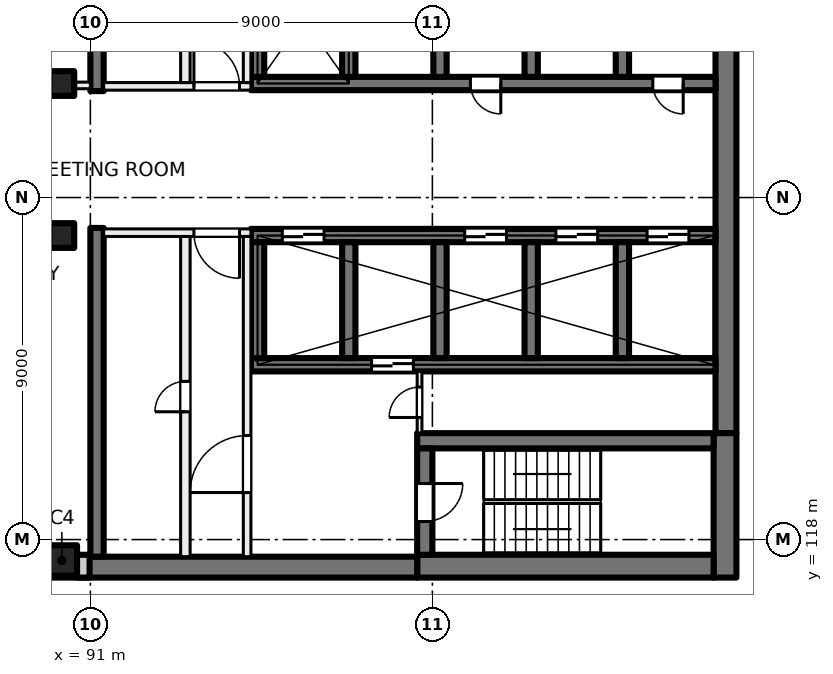
"""IFC4 building model, lengths in metres.
Left out: names, types, materials, properties, quantities, classifications, styles, units other than length and angle.
Written with IfcOpenShell. Run it as: python <this file> out.ifc"""

import sys

from ifc_helpers import new_model, si_unit, direction, frame, frame_2d, origin, origin_2d, place, context, subcontext, project, spatial, rectangle, extrude, element, fill, save


model = new_model("IFC4")
c1 = context("Model", 3, precision=1e-05, world=origin(), true_north=direction((0.0, 1.0)))
c2 = subcontext(c1, "Body", "Model", "MODEL_VIEW")
j1 = project(units=[si_unit("LENGTHUNIT", "METRE"), si_unit("PLANEANGLEUNIT", "RADIAN")], contexts=[c1])
p1 = place(None, origin())
s1 = spatial("IfcSite", under=j1, at=p1, CompositionType="ELEMENT")
p2 = place(p1, origin())
s2 = spatial("IfcBuilding", under=s1, at=p2, CompositionType="ELEMENT")
p3 = place(p2, frame((0.0, 0.0, 162.5)))
s3 = spatial("IfcBuildingStorey", under=s2, at=p3, CompositionType="ELEMENT", Elevation=162.5)
for number, where, z_axis, x_axis in (
    (1, (90.25, 130.0, 0.0), (0.0, 0.0, 1.0), (1.0, 0.0, 0.0)),
    (2, (90.25, 126.0, 0.0), (0.0, 0.0, 1.0), (1.0, 0.0, 0.0)),
):
    element("IfcColumn", number, at=place(p3, frame(where, z_axis=z_axis, x_axis=x_axis)), inside=s3, PredefinedType="COLUMN", context=c2, shape_type="SweptSolid", body=[
        extrude(rectangle(XDim=0.65, YDim=0.65, at=origin_2d()), origin(), (0.0, 0.0, 1.0), 4.0),
    ])
p4 = place(p3, frame((90.25, 117.45, 0.0), z_axis=(0.0, 0.0, 1.0), x_axis=(1.0, 0.0, 0.0)))
e3 = element("IfcColumn", 3, at=p4, inside=s3, PredefinedType="COLUMN", context=c2, shape_type="SweptSolid", body=[
    extrude(rectangle(XDim=0.8, YDim=0.8, at=origin_2d()), origin(), (0.0, 0.0, 1.0), 4.0),
])
p5 = place(p3, frame((107.725, 135.2, 0.0), z_axis=(0.0, 0.0, 1.0), x_axis=(0.0, -1.0, 0.0)))
e4 = element("IfcWall", 4, at=p5, inside=s3, PredefinedType="SHEAR", context=c2, shape_type="SweptSolid", body=[
    extrude(rectangle(XDim=14.4, YDim=0.55, at=frame_2d((7.2, 0.0))), origin(), (0.0, 0.0, 1.0), 4.0),
])
p6 = place(p3, frame((107.7, 120.8, 0.0), z_axis=(0.0, 0.0, 1.0), x_axis=(0.0, -1.0, 0.0)))
e5 = element("IfcWall", 5, at=p6, inside=s3, PredefinedType="SHEAR", context=c2, shape_type="SweptSolid", body=[
    extrude(rectangle(XDim=3.8, YDim=0.6, at=frame_2d((1.9, 0.0))), origin(), (0.0, 0.0, 1.0), 4.0),
])
p7 = place(p3, frame((107.4, 117.3, 0.0), z_axis=(0.0, 0.0, 1.0), x_axis=(-1.0, 0.0, 0.0)))
e6 = element("IfcWall", 6, at=p7, inside=s3, PredefinedType="SHEAR", context=c2, shape_type="SweptSolid", body=[
    extrude(rectangle(XDim=7.8, YDim=0.6, at=frame_2d((3.9, 0.0))), origin(), (0.0, 0.0, 1.0), 4.0),
])
p8 = place(p3, frame((99.6, 117.275, 0.0), z_axis=(0.0, 0.0, 1.0), x_axis=(-1.0, 0.0, 0.0)))
e7 = element("IfcWall", 7, at=p8, inside=s3, PredefinedType="SHEAR", context=c2, shape_type="SweptSolid", body=[
    extrude(rectangle(XDim=8.95, YDim=0.55, at=frame_2d((4.475, 0.0))), origin(), (0.0, 0.0, 1.0), 4.0),
])
p9 = place(p3, frame((107.4, 120.6, 0.0), z_axis=(0.0, 0.0, 1.0), x_axis=(-1.0, 0.0, 0.0)))
e8 = element("IfcWall", 8, at=p9, inside=s3, PredefinedType="SHEAR", context=c2, shape_type="SweptSolid", body=[
    extrude(rectangle(XDim=7.8, YDim=0.4, at=frame_2d((3.9, 0.0))), origin(), (0.0, 0.0, 1.0), 4.0),
])
p10 = place(p3, frame((99.8, 120.4, 0.0), z_axis=(0.0, 0.0, 1.0), x_axis=(0.0, -1.0, 0.0)))
e9 = element("IfcWall", 9, at=p10, inside=s3, PredefinedType="SHEAR", context=c2, shape_type="SweptSolid", body=[
    extrude(rectangle(XDim=2.8, YDim=0.4, at=frame_2d((1.4, 0.0))), origin(), (0.0, 0.0, 1.0), 4.0),
])
p11 = place(p10, frame((0.925, 0.0, 0.0)))
e10 = element("IfcOpeningElement", 10, at=p11, cuts=e9, PredefinedType="OPENING", context=c2, shape_type="SweptSolid", body=[
    extrude(rectangle(XDim=1.0, YDim=2.1, at=frame_2d((0.5, 1.05))), frame((0.0, 0.21, 0.0), z_axis=(0.0, -1.0, 0.0), x_axis=(1.0, 0.0, 0.0)), (0.0, 0.0, 1.0), 0.42),
])
p12 = place(p3, frame((107.45, 130.0, 0.0), z_axis=(0.0, 0.0, 1.0), x_axis=(-1.0, 0.0, 0.0)))
e11 = element("IfcWall", 11, at=p12, inside=s3, PredefinedType="SHEAR", context=c2, shape_type="SweptSolid", body=[
    extrude(rectangle(XDim=12.225, YDim=0.35, at=frame_2d((6.112, 0.0))), origin(), (0.0, 0.0, 1.0), 4.0),
])
p13 = place(p12, frame((0.85, 0.0, 0.0)))
e12 = element("IfcOpeningElement", 12, at=p13, cuts=e11, PredefinedType="OPENING", context=c2, shape_type="SweptSolid", body=[
    extrude(rectangle(XDim=0.8, YDim=2.1, at=frame_2d((0.4, 1.05))), frame((0.0, 0.185, 0.0), z_axis=(0.0, -1.0, 0.0), x_axis=(1.0, 0.0, 0.0)), (0.0, 0.0, 1.0), 0.37),
])
p14 = place(p12, frame((5.65, 0.0, 0.0)))
e13 = element("IfcOpeningElement", 13, at=p14, cuts=e11, PredefinedType="OPENING", context=c2, shape_type="SweptSolid", body=[
    extrude(rectangle(XDim=0.8, YDim=2.1, at=frame_2d((0.4, 1.05))), frame((0.0, 0.185, 0.0), z_axis=(0.0, -1.0, 0.0), x_axis=(1.0, 0.0, 0.0)), (0.0, 0.0, 1.0), 0.37),
])
for number, where, z_axis, x_axis in (
    (14, (105.0, 133.225, 0.0), (0.0, 0.0, 1.0), (0.0, -1.0, 0.0)),
    (15, (102.6, 133.225, 0.0), (0.0, 0.0, 1.0), (0.0, -1.0, 0.0)),
    (16, (100.2, 133.225, 0.0), (0.0, 0.0, 1.0), (0.0, -1.0, 0.0)),
    (17, (97.8, 133.225, 0.0), (0.0, 0.0, 1.0), (0.0, -1.0, 0.0)),
    (18, (95.4, 133.225, 0.0), (0.0, 0.0, 1.0), (0.0, -1.0, 0.0)),
):
    element("IfcWall", number, at=place(p3, frame(where, z_axis=z_axis, x_axis=x_axis)), inside=s3, PredefinedType="SHEAR", context=c2, shape_type="SweptSolid", body=[
        extrude(rectangle(XDim=3.05, YDim=0.35, at=frame_2d((1.525, 0.0))), origin(), (0.0, 0.0, 1.0), 4.0),
    ])
p15 = place(p3, frame((107.45, 126.0, 0.0), z_axis=(0.0, 0.0, 1.0), x_axis=(-1.0, 0.0, 0.0)))
e19 = element("IfcWall", 19, at=p15, inside=s3, PredefinedType="SHEAR", context=c2, shape_type="SweptSolid", body=[
    extrude(rectangle(XDim=12.225, YDim=0.35, at=frame_2d((6.112, 0.0))), origin(), (0.0, 0.0, 1.0), 4.0),
])
p16 = place(p15, frame((0.7, 0.0, 0.0)))
e20 = element("IfcOpeningElement", 20, at=p16, cuts=e19, PredefinedType="OPENING", context=c2, shape_type="SweptSolid", body=[
    extrude(rectangle(XDim=1.1, YDim=2.1, at=frame_2d((0.55, 1.05))), frame((0.0, 0.185, 0.0), z_axis=(0.0, -1.0, 0.0), x_axis=(1.0, 0.0, 0.0)), (0.0, 0.0, 1.0), 0.37),
])
p17 = place(p15, frame((3.1, 0.0, 0.0)))
e21 = element("IfcOpeningElement", 21, at=p17, cuts=e19, PredefinedType="OPENING", context=c2, shape_type="SweptSolid", body=[
    extrude(rectangle(XDim=1.1, YDim=2.1, at=frame_2d((0.55, 1.05))), frame((0.0, 0.185, 0.0), z_axis=(0.0, -1.0, 0.0), x_axis=(1.0, 0.0, 0.0)), (0.0, 0.0, 1.0), 0.37),
])
p18 = place(p15, frame((5.5, 0.0, 0.0)))
e22 = element("IfcOpeningElement", 22, at=p18, cuts=e19, PredefinedType="OPENING", context=c2, shape_type="SweptSolid", body=[
    extrude(rectangle(XDim=1.1, YDim=2.1, at=frame_2d((0.55, 1.05))), frame((0.0, 0.185, 0.0), z_axis=(0.0, -1.0, 0.0), x_axis=(1.0, 0.0, 0.0)), (0.0, 0.0, 1.0), 0.37),
])
p19 = place(p15, frame((10.3, 0.0, 0.0)))
e23 = element("IfcOpeningElement", 23, at=p19, cuts=e19, PredefinedType="OPENING", context=c2, shape_type="SweptSolid", body=[
    extrude(rectangle(XDim=1.1, YDim=2.1, at=frame_2d((0.55, 1.05))), frame((0.0, 0.185, 0.0), z_axis=(0.0, -1.0, 0.0), x_axis=(1.0, 0.0, 0.0)), (0.0, 0.0, 1.0), 0.37),
])
p20 = place(p3, frame((107.45, 122.6, 0.0), z_axis=(0.0, 0.0, 1.0), x_axis=(-1.0, 0.0, 0.0)))
e24 = element("IfcWall", 24, at=p20, inside=s3, PredefinedType="SHEAR", context=c2, shape_type="SweptSolid", body=[
    extrude(rectangle(XDim=12.225, YDim=0.35, at=frame_2d((6.112, 0.0))), origin(), (0.0, 0.0, 1.0), 4.0),
])
p21 = place(p20, frame((7.95, 0.0, 0.0)))
e25 = element("IfcOpeningElement", 25, at=p21, cuts=e24, PredefinedType="OPENING", context=c2, shape_type="SweptSolid", body=[
    extrude(rectangle(XDim=1.1, YDim=2.1, at=frame_2d((0.55, 1.05))), frame((0.0, 0.185, 0.0), z_axis=(0.0, -1.0, 0.0), x_axis=(1.0, 0.0, 0.0)), (0.0, 0.0, 1.0), 0.37),
])
for number, where, z_axis, x_axis in (
    (26, (105.0, 125.825, 0.0), (0.0, 0.0, 1.0), (0.0, -1.0, 0.0)),
    (27, (102.6, 125.825, 0.0), (0.0, 0.0, 1.0), (0.0, -1.0, 0.0)),
    (28, (100.2, 125.825, 0.0), (0.0, 0.0, 1.0), (0.0, -1.0, 0.0)),
    (29, (97.8, 125.825, 0.0), (0.0, 0.0, 1.0), (0.0, -1.0, 0.0)),
    (30, (95.4, 125.825, 0.0), (0.0, 0.0, 1.0), (0.0, -1.0, 0.0)),
):
    element("IfcWall", number, at=place(p3, frame(where, z_axis=z_axis, x_axis=x_axis)), inside=s3, PredefinedType="SHEAR", context=c2, shape_type="SweptSolid", body=[
        extrude(rectangle(XDim=3.05, YDim=0.35, at=frame_2d((1.525, 0.0))), origin(), (0.0, 0.0, 1.0), 4.0),
    ])
for number, where, z_axis, x_axis in (
    (31, (91.175, 138.45, 0.0), (0.0, 0.0, 1.0), (0.0, -1.0, 0.0)),
    (32, (91.175, 126.2, 0.0), (0.0, 0.0, 1.0), (0.0, -1.0, 0.0)),
):
    element("IfcWall", number, at=place(p3, frame(where, z_axis=z_axis, x_axis=x_axis)), inside=s3, PredefinedType="SHEAR", context=c2, shape_type="SweptSolid", body=[
        extrude(rectangle(XDim=8.65, YDim=0.35, at=frame_2d((4.325, 0.0))), origin(), (0.0, 0.0, 1.0), 4.0),
    ])
p22 = place(p3, frame((90.98, 117.3, 0.0), z_axis=(0.0, 0.0, 1.0), x_axis=(-1.0, 0.0, 0.0)))
e33 = element("IfcWall", 33, at=p22, inside=s3, PredefinedType="SOLIDWALL", context=c2, shape_type="SweptSolid", body=[
    extrude(rectangle(XDim=33.745, YDim=0.6, at=frame_2d((16.873, 0.0))), origin(), (0.0, 0.0, 1.0), 3.625),
])
p23 = place(p22, frame((1.48, 0.0, 0.9)))
e34 = element("IfcOpeningElement", 34, at=p23, cuts=e33, PredefinedType="OPENING", context=c2, shape_type="SweptSolid", body=[
    extrude(rectangle(XDim=3.0, YDim=2.4, at=frame_2d((1.5, 1.2))), frame((0.0, 0.31, 0.0), z_axis=(0.0, -1.0, 0.0), x_axis=(1.0, 0.0, 0.0)), (0.0, 0.0, 1.0), 0.62),
])
p24 = place(p22, frame((5.98, 0.0, 0.9)))
e35 = element("IfcOpeningElement", 35, at=p24, cuts=e33, PredefinedType="OPENING", context=c2, shape_type="SweptSolid", body=[
    extrude(rectangle(XDim=3.0, YDim=2.4, at=frame_2d((1.5, 1.2))), frame((0.0, 0.31, 0.0), z_axis=(0.0, -1.0, 0.0), x_axis=(1.0, 0.0, 0.0)), (0.0, 0.0, 1.0), 0.62),
])
p25 = place(p22, frame((10.48, 0.0, 0.9)))
e36 = element("IfcOpeningElement", 36, at=p25, cuts=e33, PredefinedType="OPENING", context=c2, shape_type="SweptSolid", body=[
    extrude(rectangle(XDim=3.0, YDim=2.4, at=frame_2d((1.5, 1.2))), frame((0.0, 0.31, 0.0), z_axis=(0.0, -1.0, 0.0), x_axis=(1.0, 0.0, 0.0)), (0.0, 0.0, 1.0), 0.62),
])
p26 = place(p22, frame((14.98, 0.0, 0.9)))
e37 = element("IfcOpeningElement", 37, at=p26, cuts=e33, PredefinedType="OPENING", context=c2, shape_type="SweptSolid", body=[
    extrude(rectangle(XDim=3.0, YDim=2.4, at=frame_2d((1.5, 1.2))), frame((0.0, 0.31, 0.0), z_axis=(0.0, -1.0, 0.0), x_axis=(1.0, 0.0, 0.0)), (0.0, 0.0, 1.0), 0.62),
])
p27 = place(p22, frame((19.48, 0.0, 0.9)))
e38 = element("IfcOpeningElement", 38, at=p27, cuts=e33, PredefinedType="OPENING", context=c2, shape_type="SweptSolid", body=[
    extrude(rectangle(XDim=3.0, YDim=2.4, at=frame_2d((1.5, 1.2))), frame((0.0, 0.31, 0.0), z_axis=(0.0, -1.0, 0.0), x_axis=(1.0, 0.0, 0.0)), (0.0, 0.0, 1.0), 0.62),
])
p28 = place(p22, frame((23.98, 0.0, 0.9)))
e39 = element("IfcOpeningElement", 39, at=p28, cuts=e33, PredefinedType="OPENING", context=c2, shape_type="SweptSolid", body=[
    extrude(rectangle(XDim=3.0, YDim=2.4, at=frame_2d((1.5, 1.2))), frame((0.0, 0.31, 0.0), z_axis=(0.0, -1.0, 0.0), x_axis=(1.0, 0.0, 0.0)), (0.0, 0.0, 1.0), 0.62),
])
p29 = place(p22, frame((28.48, 0.0, 0.9)))
e40 = element("IfcOpeningElement", 40, at=p29, cuts=e33, PredefinedType="OPENING", context=c2, shape_type="SweptSolid", body=[
    extrude(rectangle(XDim=3.0, YDim=2.4, at=frame_2d((1.5, 1.2))), frame((0.0, 0.31, 0.0), z_axis=(0.0, -1.0, 0.0), x_axis=(1.0, 0.0, 0.0)), (0.0, 0.0, 1.0), 0.62),
])
p30 = place(p3, frame((95.225, 126.075, 0.0), z_axis=(0.0, 0.0, 1.0), x_axis=(-1.0, 0.0, 0.0)))
e41 = element("IfcWall", 41, at=p30, inside=s3, PredefinedType="PARTITIONING", context=c2, shape_type="SweptSolid", body=[
    extrude(rectangle(XDim=3.875, YDim=0.2, at=frame_2d((1.938, 0.0))), origin(), (0.0, 0.0, 1.0), 3.625),
])
p31 = place(p30, frame((0.3, 0.0, 0.0)))
e42 = element("IfcOpeningElement", 42, at=p31, cuts=e41, PredefinedType="OPENING", context=c2, shape_type="SweptSolid", body=[
    extrude(rectangle(XDim=1.2, YDim=2.1, at=frame_2d((0.6, 1.05))), frame((0.0, 0.11, 0.0), z_axis=(0.0, -1.0, 0.0), x_axis=(1.0, 0.0, 0.0)), (0.0, 0.0, 1.0), 0.22),
])
p32 = place(p3, frame((95.125, 117.55, 0.0), z_axis=(0.0, 0.0, 1.0), x_axis=(0.0, 1.0, 0.0)))
e43 = element("IfcWall", 43, at=p32, inside=s3, PredefinedType="PARTITIONING", context=c2, shape_type="SweptSolid", body=[
    extrude(rectangle(XDim=8.425, YDim=0.2, at=frame_2d((4.212, 0.0))), origin(), (0.0, 0.0, 1.0), 3.625),
])
p33 = place(p32, frame((1.688, 0.0, 0.0)))
e44 = element("IfcOpeningElement", 44, at=p33, cuts=e43, PredefinedType="OPENING", context=c2, shape_type="SweptSolid", body=[
    extrude(rectangle(XDim=1.5, YDim=2.1, at=frame_2d((0.75, 1.05))), frame((0.0, 0.11, 0.0), z_axis=(0.0, -1.0, 0.0), x_axis=(1.0, 0.0, 0.0)), (0.0, 0.0, 1.0), 0.22),
])
p34 = place(p3, frame((93.5, 117.55, 0.0), z_axis=(0.0, 0.0, 1.0), x_axis=(0.0, 1.0, 0.0)))
e45 = element("IfcWall", 45, at=p34, inside=s3, PredefinedType="PARTITIONING", context=c2, shape_type="SweptSolid", body=[
    extrude(rectangle(XDim=8.425, YDim=0.25, at=frame_2d((4.212, 0.0))), origin(), (0.0, 0.0, 1.0), 3.625),
])
p35 = place(p34, frame((3.812, 0.0, 0.0)))
e46 = element("IfcOpeningElement", 46, at=p35, cuts=e45, PredefinedType="OPENING", context=c2, shape_type="SweptSolid", body=[
    extrude(rectangle(XDim=0.8, YDim=2.1, at=frame_2d((0.4, 1.05))), frame((0.0, 0.135, 0.0), z_axis=(0.0, -1.0, 0.0), x_axis=(1.0, 0.0, 0.0)), (0.0, 0.0, 1.0), 0.27),
])
p36 = place(p3, frame((99.663, 120.8, 0.0), z_axis=(0.0, 0.0, 1.0), x_axis=(0.0, 1.0, 0.0)))
e47 = element("IfcWall", 47, at=p36, inside=s3, PredefinedType="PARTITIONING", context=c2, shape_type="SweptSolid", body=[
    extrude(rectangle(XDim=1.625, YDim=0.125, at=frame_2d((0.812, 0.0))), origin(), (0.0, 0.0, 1.0), 3.625),
])
p37 = place(p36, frame((0.413, 0.0, 0.0)))
e48 = element("IfcOpeningElement", 48, at=p37, cuts=e47, PredefinedType="OPENING", context=c2, shape_type="SweptSolid", body=[
    extrude(rectangle(XDim=0.8, YDim=2.1, at=frame_2d((0.4, 1.05))), frame((0.0, 0.073, 0.0), z_axis=(0.0, -1.0, 0.0), x_axis=(1.0, 0.0, 0.0)), (0.0, 0.0, 1.0), 0.145),
])
p38 = place(p3, frame((91.35, 129.925, 0.0), z_axis=(0.0, 0.0, 1.0), x_axis=(1.0, 0.0, 0.0)))
e49 = element("IfcWall", 49, at=p38, inside=s3, PredefinedType="PARTITIONING", context=c2, shape_type="SweptSolid", body=[
    extrude(rectangle(XDim=3.875, YDim=0.2, at=frame_2d((1.938, 0.0))), origin(), (0.0, 0.0, 1.0), 3.625),
])
p39 = place(p38, frame((2.375, 0.0, 0.0)))
e50 = element("IfcOpeningElement", 50, at=p39, cuts=e49, PredefinedType="OPENING", context=c2, shape_type="SweptSolid", body=[
    extrude(rectangle(XDim=1.2, YDim=2.1, at=frame_2d((0.6, 1.05))), frame((0.0, 0.11, 0.0), z_axis=(0.0, -1.0, 0.0), x_axis=(1.0, 0.0, 0.0)), (0.0, 0.0, 1.0), 0.22),
])
p40 = place(p3, frame((95.125, 130.025, 0.0), z_axis=(0.0, 0.0, 1.0), x_axis=(0.0, 1.0, 0.0)))
e51 = element("IfcWall", 51, at=p40, inside=s3, PredefinedType="PARTITIONING", context=c2, shape_type="SweptSolid", body=[
    extrude(rectangle(XDim=8.425, YDim=0.2, at=frame_2d((4.212, 0.0))), origin(), (0.0, 0.0, 1.0), 3.625),
])
p41 = place(p40, frame((5.238, 0.0, 0.0)))
e52 = element("IfcOpeningElement", 52, at=p41, cuts=e51, PredefinedType="OPENING", context=c2, shape_type="SweptSolid", body=[
    extrude(rectangle(XDim=1.5, YDim=2.1, at=frame_2d((0.75, 1.05))), frame((0.0, 0.11, 0.0), z_axis=(0.0, -1.0, 0.0), x_axis=(1.0, 0.0, 0.0)), (0.0, 0.0, 1.0), 0.22),
])
p42 = place(p3, frame((93.5, 130.025, 0.0), z_axis=(0.0, 0.0, 1.0), x_axis=(0.0, 1.0, 0.0)))
e53 = element("IfcWall", 53, at=p42, inside=s3, PredefinedType="PARTITIONING", context=c2, shape_type="SweptSolid", body=[
    extrude(rectangle(XDim=8.425, YDim=0.25, at=frame_2d((4.212, 0.0))), origin(), (0.0, 0.0, 1.0), 3.625),
])
p43 = place(p42, frame((0.978, 0.0, 0.0)))
e54 = element("IfcOpeningElement", 54, at=p43, cuts=e53, PredefinedType="OPENING", context=c2, shape_type="SweptSolid", body=[
    extrude(rectangle(XDim=0.8, YDim=2.1, at=frame_2d((0.4, 1.05))), frame((0.0, 0.135, 0.0), z_axis=(0.0, -1.0, 0.0), x_axis=(1.0, 0.0, 0.0)), (0.0, 0.0, 1.0), 0.27),
])
p44 = place(p42, frame((5.24, 0.0, 0.0)))
e55 = element("IfcOpeningElement", 55, at=p44, cuts=e53, PredefinedType="OPENING", context=c2, shape_type="SweptSolid", body=[
    extrude(rectangle(XDim=0.8, YDim=2.1, at=frame_2d((0.4, 1.05))), frame((0.0, 0.135, 0.0), z_axis=(0.0, -1.0, 0.0), x_axis=(1.0, 0.0, 0.0)), (0.0, 0.0, 1.0), 0.27),
])
p45 = place(p3, frame((85.838, 129.95, 0.0), z_axis=(0.0, 0.0, 1.0), x_axis=(1.0, 0.0, 0.0)))
e56 = element("IfcWall", 56, at=p45, inside=s3, PredefinedType="PARTITIONING", context=c2, shape_type="SweptSolid", body=[
    extrude(rectangle(XDim=5.162, YDim=0.175, at=frame_2d((2.581, 0.0))), origin(), (0.0, 0.0, 1.0), 3.625),
])
p46 = place(p45, frame((1.971, 0.0, 0.0)))
e57 = element("IfcOpeningElement", 57, at=p46, cuts=e56, PredefinedType="OPENING", context=c2, shape_type="SweptSolid", body=[
    extrude(rectangle(XDim=1.2, YDim=2.1, at=frame_2d((0.6, 1.05))), frame((0.0, 0.097, 0.0), z_axis=(0.0, -1.0, 0.0), x_axis=(1.0, 0.0, 0.0)), (0.0, 0.0, 1.0), 0.195),
])
p47 = place(p16, origin())
e58 = element("IfcDoor", 58, at=p47, inside=s3, OperationType="DOUBLE_DOOR_SLIDING", PredefinedType="DOOR", context=c2, shape_type="SweptSolid", body=[
    extrude(rectangle(XDim=1.1, YDim=2.1, at=frame_2d((0.55, 1.05))), frame((0.0, 0.025, 0.0), z_axis=(0.0, -1.0, 0.0), x_axis=(1.0, 0.0, 0.0)), (0.0, 0.0, 1.0), 0.05),
])
fill(e20, e58)
p48 = place(p17, origin())
e59 = element("IfcDoor", 59, at=p48, inside=s3, OperationType="DOUBLE_DOOR_SLIDING", PredefinedType="DOOR", context=c2, shape_type="SweptSolid", body=[
    extrude(rectangle(XDim=1.1, YDim=2.1, at=frame_2d((0.55, 1.05))), frame((0.0, 0.025, 0.0), z_axis=(0.0, -1.0, 0.0), x_axis=(1.0, 0.0, 0.0)), (0.0, 0.0, 1.0), 0.05),
])
fill(e21, e59)
p49 = place(p18, origin())
e60 = element("IfcDoor", 60, at=p49, inside=s3, OperationType="DOUBLE_DOOR_SLIDING", PredefinedType="DOOR", context=c2, shape_type="SweptSolid", body=[
    extrude(rectangle(XDim=1.1, YDim=2.1, at=frame_2d((0.55, 1.05))), frame((0.0, 0.025, 0.0), z_axis=(0.0, -1.0, 0.0), x_axis=(1.0, 0.0, 0.0)), (0.0, 0.0, 1.0), 0.05),
])
fill(e22, e60)
p50 = place(p19, origin())
e61 = element("IfcDoor", 61, at=p50, inside=s3, OperationType="DOUBLE_DOOR_SLIDING", PredefinedType="DOOR", context=c2, shape_type="SweptSolid", body=[
    extrude(rectangle(XDim=1.1, YDim=2.1, at=frame_2d((0.55, 1.05))), frame((0.0, 0.025, 0.0), z_axis=(0.0, -1.0, 0.0), x_axis=(1.0, 0.0, 0.0)), (0.0, 0.0, 1.0), 0.05),
])
fill(e23, e61)
p51 = place(p13, origin())
e62 = element("IfcDoor", 62, at=p51, inside=s3, OperationType="SINGLE_SWING_LEFT", PredefinedType="DOOR", context=c2, shape_type="SweptSolid", body=[
    extrude(rectangle(XDim=0.8, YDim=2.1, at=frame_2d((0.4, 1.05))), frame((0.0, 0.025, 0.0), z_axis=(0.0, -1.0, 0.0), x_axis=(1.0, 0.0, 0.0)), (0.0, 0.0, 1.0), 0.05),
])
fill(e12, e62)
p52 = place(p14, origin())
e63 = element("IfcDoor", 63, at=p52, inside=s3, OperationType="SINGLE_SWING_RIGHT", PredefinedType="DOOR", context=c2, shape_type="SweptSolid", body=[
    extrude(rectangle(XDim=0.8, YDim=2.1, at=frame_2d((0.4, 1.05))), frame((0.0, 0.025, 0.0), z_axis=(0.0, -1.0, 0.0), x_axis=(1.0, 0.0, 0.0)), (0.0, 0.0, 1.0), 0.05),
])
fill(e13, e63)
p53 = place(p31, origin())
e64 = element("IfcDoor", 64, at=p53, inside=s3, OperationType="DOUBLE_DOOR_SINGLE_SWING", PredefinedType="DOOR", context=c2, shape_type="SweptSolid", body=[
    extrude(rectangle(XDim=1.2, YDim=2.1, at=frame_2d((0.6, 1.05))), frame((0.0, 0.025, 0.0), z_axis=(0.0, -1.0, 0.0), x_axis=(1.0, 0.0, 0.0)), (0.0, 0.0, 1.0), 0.05),
])
fill(e42, e64)
p54 = place(p33, origin())
e65 = element("IfcDoor", 65, at=p54, inside=s3, OperationType="DOUBLE_DOOR_SINGLE_SWING", PredefinedType="DOOR", context=c2, shape_type="SweptSolid", body=[
    extrude(rectangle(XDim=1.5, YDim=2.1, at=frame_2d((0.75, 1.05))), frame((0.0, 0.025, 0.0), z_axis=(0.0, -1.0, 0.0), x_axis=(1.0, 0.0, 0.0)), (0.0, 0.0, 1.0), 0.05),
])
fill(e44, e65)
p55 = place(p11, origin())
e66 = element("IfcDoor", 66, at=p55, inside=s3, OperationType="SINGLE_SWING_LEFT", PredefinedType="DOOR", context=c2, shape_type="SweptSolid", body=[
    extrude(rectangle(XDim=1.0, YDim=2.1, at=frame_2d((0.5, 1.05))), frame((0.0, 0.025, 0.0), z_axis=(0.0, -1.0, 0.0), x_axis=(1.0, 0.0, 0.0)), (0.0, 0.0, 1.0), 0.05),
])
fill(e10, e66)
p56 = place(p37, origin())
e67 = element("IfcDoor", 67, at=p56, inside=s3, OperationType="SINGLE_SWING_RIGHT", PredefinedType="DOOR", context=c2, shape_type="SweptSolid", body=[
    extrude(rectangle(XDim=0.8, YDim=2.1, at=frame_2d((0.4, 1.05))), frame((0.0, 0.025, 0.0), z_axis=(0.0, -1.0, 0.0), x_axis=(1.0, 0.0, 0.0)), (0.0, 0.0, 1.0), 0.05),
])
fill(e48, e67)
p57 = place(p35, origin())
e68 = element("IfcDoor", 68, at=p57, inside=s3, OperationType="SINGLE_SWING_LEFT", PredefinedType="DOOR", context=c2, shape_type="SweptSolid", body=[
    extrude(rectangle(XDim=0.8, YDim=2.1, at=frame_2d((0.4, 1.05))), frame((0.0, 0.025, 0.0), z_axis=(0.0, -1.0, 0.0), x_axis=(1.0, 0.0, 0.0)), (0.0, 0.0, 1.0), 0.05),
])
fill(e46, e68)
p58 = place(p39, origin())
e69 = element("IfcDoor", 69, at=p58, inside=s3, OperationType="DOUBLE_DOOR_SINGLE_SWING", PredefinedType="DOOR", context=c2, shape_type="SweptSolid", body=[
    extrude(rectangle(XDim=1.2, YDim=2.1, at=frame_2d((0.6, 1.05))), frame((0.0, 0.025, 0.0), z_axis=(0.0, -1.0, 0.0), x_axis=(1.0, 0.0, 0.0)), (0.0, 0.0, 1.0), 0.05),
])
fill(e50, e69)
p59 = place(p21, origin())
e70 = element("IfcDoor", 70, at=p59, inside=s3, OperationType="DOUBLE_DOOR_SLIDING", PredefinedType="DOOR", context=c2, shape_type="SweptSolid", body=[
    extrude(rectangle(XDim=1.1, YDim=2.1, at=frame_2d((0.55, 1.05))), frame((0.0, 0.025, 0.0), z_axis=(0.0, -1.0, 0.0), x_axis=(1.0, 0.0, 0.0)), (0.0, 0.0, 1.0), 0.05),
])
fill(e25, e70)
save(model, sys.argv[1])
